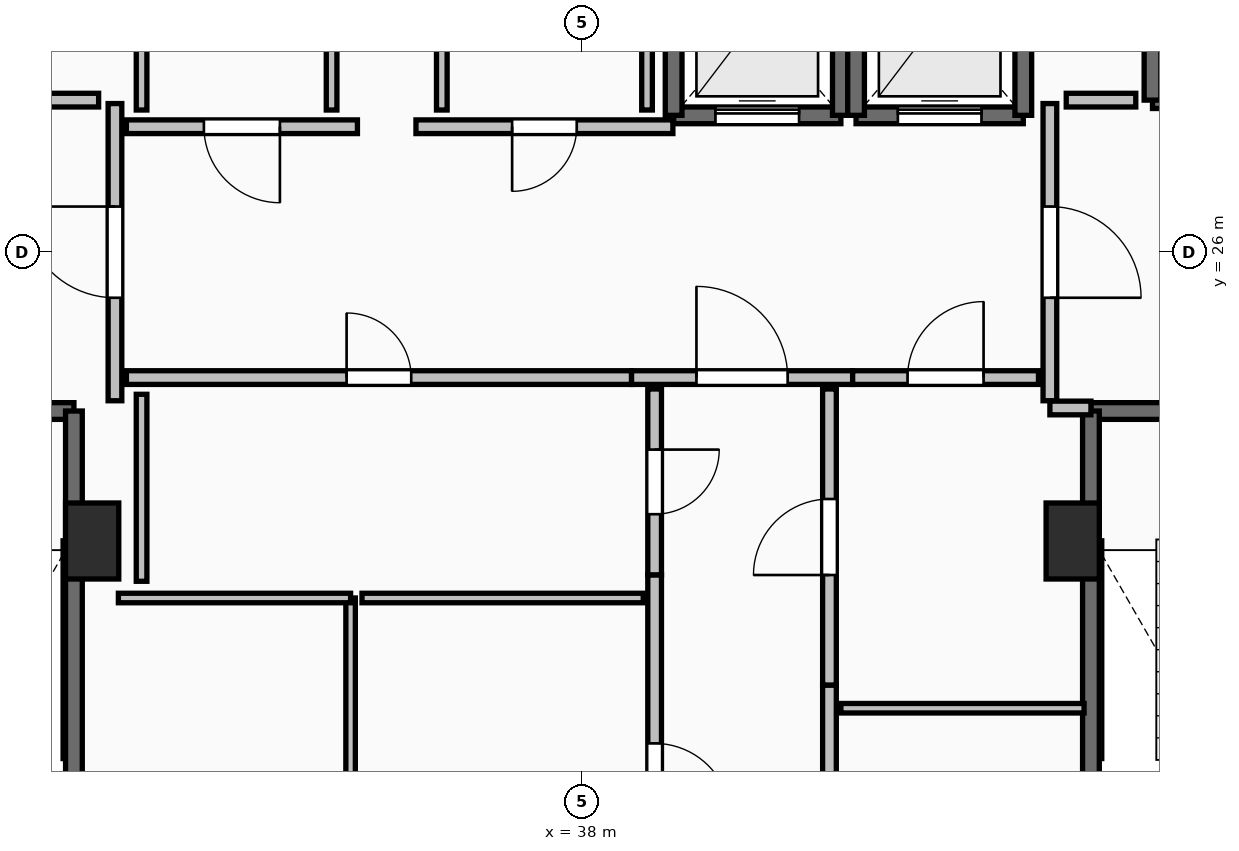
"""IFC4 building model, lengths in metres.
Left out: names, types, materials, properties, quantities, classifications, styles, units other than length and angle.
Written with IfcOpenShell. Run it as: python <this file> out.ifc"""

import sys

from ifc_helpers import new_model, si_unit, direction, frame, frame_2d, origin, origin_2d, place, context, subcontext, project, spatial, rectangle, extrude, element, fill, save


model = new_model("IFC4")
c1 = context("Model", 3, precision=1e-05, world=origin(), true_north=direction((0.0, 1.0)))
c2 = subcontext(c1, "Body", "Model", "MODEL_VIEW")
j1 = project(units=[si_unit("LENGTHUNIT", "METRE"), si_unit("PLANEANGLEUNIT", "RADIAN")], contexts=[c1])
p1 = place(None, origin())
s1 = spatial("IfcSite", under=j1, at=p1, CompositionType="ELEMENT")
p2 = place(p1, origin())
s2 = spatial("IfcBuilding", under=s1, at=p2, CompositionType="ELEMENT")
p3 = place(p2, frame((0.0, 0.0, 276.85)))
s3 = spatial("IfcBuildingStorey", under=s2, at=p3, CompositionType="ELEMENT", Elevation=276.85)
for number, where, z_axis, x_axis in (
    (1, (31.55, 22.2, 0.0), (0.0, 0.0, 1.0), (1.0, 0.0, 0.0)),
    (2, (44.45, 22.2, 0.0), (0.0, 0.0, 1.0), (1.0, 0.0, 0.0)),
):
    element("IfcColumn", number, at=place(p3, frame(where, z_axis=z_axis, x_axis=x_axis)), inside=s3, PredefinedType="PILASTER", context=c2, shape_type="SweptSolid", body=[
        extrude(rectangle(XDim=0.7, YDim=1.0, at=origin_2d()), origin(), (0.0, 0.0, 1.0), 3.55),
    ])
p4 = place(p3, frame((27.94, 23.91, 0.0), z_axis=(0.0, 0.0, 1.0), x_axis=(1.0, 0.0, 0.0)))
e3 = element("IfcWall", 3, at=p4, inside=s3, PredefinedType="SOLIDWALL", context=c2, shape_type="SweptSolid", body=[
    extrude(rectangle(XDim=3.37, YDim=0.22, at=frame_2d((1.685, 0.0))), origin(), (0.0, 0.0, 1.0), 3.19),
])
p5 = place(p4, frame((1.135, 0.0, 0.0)))
e4 = element("IfcOpeningElement", 4, at=p5, cuts=e3, PredefinedType="OPENING", context=c2, shape_type="SweptSolid", body=[
    extrude(rectangle(XDim=1.1, YDim=2.15, at=frame_2d((0.55, 1.075))), frame((0.0, 0.125, 0.0), z_axis=(0.0, -1.0, 0.0), x_axis=(1.0, 0.0, 0.0)), (0.0, 0.0, 1.0), 0.25),
])
p6 = place(p3, frame((31.31, 23.91, 0.0), z_axis=(0.0, 0.0, 1.0), x_axis=(0.0, -1.0, 0.0)))
e5 = element("IfcWall", 5, at=p6, inside=s3, PredefinedType="SOLIDWALL", context=c2, shape_type="SweptSolid", body=[
    extrude(rectangle(XDim=7.42, YDim=0.22, at=frame_2d((3.71, 0.0))), origin(), (0.0, 0.0, 1.0), 3.19),
])
p7 = place(p3, frame((44.69, 23.91, 0.0), z_axis=(0.0, 0.0, 1.0), x_axis=(1.0, 0.0, 0.0)))
e6 = element("IfcWall", 6, at=p7, inside=s3, PredefinedType="SOLIDWALL", context=c2, shape_type="SweptSolid", body=[
    extrude(rectangle(XDim=3.37, YDim=0.22, at=frame_2d((1.685, 0.0))), origin(), (0.0, 0.0, 1.0), 3.19),
])
p8 = place(p7, frame((1.135, 0.0, 0.0)))
e7 = element("IfcOpeningElement", 7, at=p8, cuts=e6, PredefinedType="OPENING", context=c2, shape_type="SweptSolid", body=[
    extrude(rectangle(XDim=1.1, YDim=2.15, at=frame_2d((0.55, 1.075))), frame((0.0, 0.125, 0.0), z_axis=(0.0, -1.0, 0.0), x_axis=(1.0, 0.0, 0.0)), (0.0, 0.0, 1.0), 0.25),
])
p9 = place(p3, frame((44.69, 16.49, 0.0), z_axis=(0.0, 0.0, 1.0), x_axis=(0.0, 1.0, 0.0)))
e8 = element("IfcWall", 8, at=p9, inside=s3, PredefinedType="SOLIDWALL", context=c2, shape_type="SweptSolid", body=[
    extrude(rectangle(XDim=7.42, YDim=0.22, at=frame_2d((3.71, 0.0))), origin(), (0.0, 0.0, 1.0), 3.19),
])
p10 = place(p3, frame((39.2, 27.8, 0.0), z_axis=(0.0, 0.0, 1.0), x_axis=(1.0, 0.0, 0.0)))
e9 = element("IfcWall", 9, at=p10, inside=s3, PredefinedType="SOLIDWALL", context=c2, shape_type="SweptSolid", body=[
    extrude(rectangle(XDim=2.2, YDim=0.22, at=frame_2d((1.1, 0.0))), origin(), (0.0, 0.0, 1.0), 3.19),
])
p11 = place(p10, frame((0.55, 0.0, 0.0)))
e10 = element("IfcOpeningElement", 10, at=p11, cuts=e9, PredefinedType="OPENING", context=c2, shape_type="SweptSolid", body=[
    extrude(rectangle(XDim=1.1, YDim=2.2, at=frame_2d((0.55, 1.1))), frame((0.0, 0.125, 0.0), z_axis=(0.0, -1.0, 0.0), x_axis=(1.0, 0.0, 0.0)), (0.0, 0.0, 1.0), 0.25),
])
for number, where, z_axis, x_axis in (
    (11, (41.4, 27.8, 0.0), (0.0, 0.0, 1.0), (0.0, 1.0, 0.0)),
    (12, (39.2, 30.4, 0.0), (0.0, 0.0, 1.0), (0.0, -1.0, 0.0)),
):
    element("IfcWall", number, at=place(p3, frame(where, z_axis=z_axis, x_axis=x_axis)), inside=s3, PredefinedType="SOLIDWALL", context=c2, shape_type="SweptSolid", body=[
        extrude(rectangle(XDim=2.6, YDim=0.22, at=frame_2d((1.3, 0.0))), origin(), (0.0, 0.0, 1.0), 3.19),
    ])
p12 = place(p3, frame((41.6, 27.8, 0.0), z_axis=(0.0, 0.0, 1.0), x_axis=(1.0, 0.0, 0.0)))
e13 = element("IfcWall", 13, at=p12, inside=s3, PredefinedType="SOLIDWALL", context=c2, shape_type="SweptSolid", body=[
    extrude(rectangle(XDim=2.2, YDim=0.22, at=frame_2d((1.1, 0.0))), origin(), (0.0, 0.0, 1.0), 3.19),
])
p13 = place(p12, frame((0.55, 0.0, 0.0)))
e14 = element("IfcOpeningElement", 14, at=p13, cuts=e13, PredefinedType="OPENING", context=c2, shape_type="SweptSolid", body=[
    extrude(rectangle(XDim=1.1, YDim=2.2, at=frame_2d((0.55, 1.1))), frame((0.0, 0.125, 0.0), z_axis=(0.0, -1.0, 0.0), x_axis=(1.0, 0.0, 0.0)), (0.0, 0.0, 1.0), 0.25),
])
for number, where, z_axis, x_axis in (
    (15, (43.8, 27.8, 0.0), (0.0, 0.0, 1.0), (0.0, 1.0, 0.0)),
    (16, (41.6, 30.4, 0.0), (0.0, 0.0, 1.0), (0.0, -1.0, 0.0)),
):
    element("IfcWall", number, at=place(p3, frame(where, z_axis=z_axis, x_axis=x_axis)), inside=s3, PredefinedType="SOLIDWALL", context=c2, shape_type="SweptSolid", body=[
        extrude(rectangle(XDim=2.6, YDim=0.22, at=frame_2d((1.3, 0.0))), origin(), (0.0, 0.0, 1.0), 3.19),
    ])
p14 = place(p3, frame((45.5, 28.0, 0.0), z_axis=(0.0, 0.0, 1.0), x_axis=(1.0, 0.0, 0.0)))
e17 = element("IfcWall", 17, at=p14, inside=s3, PredefinedType="SHEAR", context=c2, shape_type="SweptSolid", body=[
    extrude(rectangle(XDim=2.4, YDim=0.22, at=frame_2d((1.2, 0.0))), origin(), (0.0, 0.0, 1.0), 3.19),
])
p15 = place(p14, frame((0.6, 0.0, 0.0)))
e18 = element("IfcOpeningElement", 18, at=p15, cuts=e17, PredefinedType="OPENING", context=c2, shape_type="SweptSolid", body=[
    extrude(rectangle(XDim=1.2, YDim=2.2, at=frame_2d((0.6, 1.1))), frame((0.0, 0.125, 0.0), z_axis=(0.0, -1.0, 0.0), x_axis=(1.0, 0.0, 0.0)), (0.0, 0.0, 1.0), 0.25),
])
p16 = place(p3, frame((45.5, 30.5, 0.0), z_axis=(0.0, 0.0, 1.0), x_axis=(0.0, -1.0, 0.0)))
e19 = element("IfcWall", 19, at=p16, inside=s3, PredefinedType="SHEAR", context=c2, shape_type="SweptSolid", body=[
    extrude(rectangle(XDim=2.5, YDim=0.22, at=frame_2d((1.25, 0.0))), origin(), (0.0, 0.0, 1.0), 3.19),
])
p17 = place(p3, frame((31.85, 24.045, 0.0), z_axis=(0.0, 0.0, 1.0), x_axis=(0.0, 1.0, 0.0)))
e20 = element("IfcWall", 20, at=p17, inside=s3, PredefinedType="PARTITIONING", context=c2, shape_type="SweptSolid", body=[
    extrude(rectangle(XDim=3.91, YDim=0.18, at=frame_2d((1.955, 0.0))), origin(), (0.0, 0.0, 1.0), 3.19),
])
p18 = place(p17, frame((1.355, 0.0, 0.0)))
e21 = element("IfcOpeningElement", 21, at=p18, cuts=e20, PredefinedType="OPENING", context=c2, shape_type="SweptSolid", body=[
    extrude(rectangle(XDim=1.2, YDim=2.15, at=frame_2d((0.6, 1.075))), frame((0.0, 0.105, 0.0), z_axis=(0.0, -1.0, 0.0), x_axis=(1.0, 0.0, 0.0)), (0.0, 0.0, 1.0), 0.21),
])
p19 = place(p3, frame((44.15, 27.955, 0.0), z_axis=(0.0, 0.0, 1.0), x_axis=(0.0, -1.0, 0.0)))
e22 = element("IfcWall", 22, at=p19, inside=s3, PredefinedType="PARTITIONING", context=c2, shape_type="SweptSolid", body=[
    extrude(rectangle(XDim=3.91, YDim=0.18, at=frame_2d((1.955, 0.0))), origin(), (0.0, 0.0, 1.0), 3.19),
])
p20 = place(p19, frame((1.355, 0.0, 0.0)))
e23 = element("IfcOpeningElement", 23, at=p20, cuts=e22, PredefinedType="OPENING", context=c2, shape_type="SweptSolid", body=[
    extrude(rectangle(XDim=1.2, YDim=2.15, at=frame_2d((0.6, 1.075))), frame((0.0, 0.105, 0.0), z_axis=(0.0, -1.0, 0.0), x_axis=(1.0, 0.0, 0.0)), (0.0, 0.0, 1.0), 0.21),
])
p21 = place(p3, frame((44.15, 23.95, 0.0), z_axis=(0.0, 0.0, 1.0), x_axis=(1.0, 0.0, 0.0)))
e24 = element("IfcWall", 24, at=p21, inside=s3, PredefinedType="PARTITIONING", context=c2, shape_type="SweptSolid", body=[
    extrude(rectangle(XDim=0.54, YDim=0.18, at=frame_2d((0.27, 0.0))), origin(), (0.0, 0.0, 1.0), 3.19),
])
p22 = place(p3, frame((38.645, 24.35, 0.0), z_axis=(0.0, 0.0, 1.0), x_axis=(1.0, 0.0, 0.0)))
e25 = element("IfcWall", 25, at=p22, inside=s3, PredefinedType="PARTITIONING", context=c2, shape_type="SweptSolid", body=[
    extrude(rectangle(XDim=2.91, YDim=0.18, at=frame_2d((1.455, 0.0))), origin(), (0.0, 0.0, 1.0), 3.19),
])
p23 = place(p22, frame((0.855, 0.0, 0.0)))
e26 = element("IfcOpeningElement", 26, at=p23, cuts=e25, PredefinedType="OPENING", context=c2, shape_type="SweptSolid", body=[
    extrude(rectangle(XDim=1.2, YDim=2.15, at=frame_2d((0.6, 1.075))), frame((0.0, 0.105, 0.0), z_axis=(0.0, -1.0, 0.0), x_axis=(1.0, 0.0, 0.0)), (0.0, 0.0, 1.0), 0.21),
])
p24 = place(p3, frame((41.555, 24.35, 0.0), z_axis=(0.0, 0.0, 1.0), x_axis=(1.0, 0.0, 0.0)))
e27 = element("IfcWall", 27, at=p24, inside=s3, PredefinedType="PARTITIONING", context=c2, shape_type="SweptSolid", body=[
    extrude(rectangle(XDim=2.445, YDim=0.18, at=frame_2d((1.223, 0.0))), origin(), (0.0, 0.0, 1.0), 3.19),
])
p25 = place(p24, frame((0.722, 0.0, 0.0)))
e28 = element("IfcOpeningElement", 28, at=p25, cuts=e27, PredefinedType="OPENING", context=c2, shape_type="SweptSolid", body=[
    extrude(rectangle(XDim=1.0, YDim=2.15, at=frame_2d((0.5, 1.075))), frame((0.0, 0.105, 0.0), z_axis=(0.0, -1.0, 0.0), x_axis=(1.0, 0.0, 0.0)), (0.0, 0.0, 1.0), 0.21),
])
p26 = place(p3, frame((35.04, 27.65, 0.0), z_axis=(0.0, 0.0, 1.0), x_axis=(-1.0, 0.0, 0.0)))
e29 = element("IfcWall", 29, at=p26, inside=s3, PredefinedType="PARTITIONING", context=c2, shape_type="SweptSolid", body=[
    extrude(rectangle(XDim=3.04, YDim=0.18, at=frame_2d((1.52, 0.0))), origin(), (0.0, 0.0, 1.0), 3.19),
])
p27 = place(p26, frame((1.02, 0.0, 0.0)))
e30 = element("IfcOpeningElement", 30, at=p27, cuts=e29, PredefinedType="OPENING", context=c2, shape_type="SweptSolid", body=[
    extrude(rectangle(XDim=1.0, YDim=2.15, at=frame_2d((0.5, 1.075))), frame((0.0, 0.105, 0.0), z_axis=(0.0, -1.0, 0.0), x_axis=(1.0, 0.0, 0.0)), (0.0, 0.0, 1.0), 0.21),
])
p28 = place(p3, frame((39.19, 27.65, 0.0), z_axis=(0.0, 0.0, 1.0), x_axis=(-1.0, 0.0, 0.0)))
e31 = element("IfcWall", 31, at=p28, inside=s3, PredefinedType="PARTITIONING", context=c2, shape_type="SweptSolid", body=[
    extrude(rectangle(XDim=3.38, YDim=0.18, at=frame_2d((1.69, 0.0))), origin(), (0.0, 0.0, 1.0), 3.19),
])
p29 = place(p28, frame((1.265, 0.0, 0.0)))
e32 = element("IfcOpeningElement", 32, at=p29, cuts=e31, PredefinedType="OPENING", context=c2, shape_type="SweptSolid", body=[
    extrude(rectangle(XDim=0.85, YDim=2.1, at=frame_2d((0.425, 1.05))), frame((0.0, 0.105, 0.0), z_axis=(0.0, -1.0, 0.0), x_axis=(1.0, 0.0, 0.0)), (0.0, 0.0, 1.0), 0.21),
])
p30 = place(p3, frame((32.0, 24.35, 0.0), z_axis=(0.0, 0.0, 1.0), x_axis=(1.0, 0.0, 0.0)))
e33 = element("IfcWall", 33, at=p30, inside=s3, PredefinedType="PARTITIONING", context=c2, shape_type="SweptSolid", body=[
    extrude(rectangle(XDim=6.645, YDim=0.18, at=frame_2d((3.323, 0.0))), origin(), (0.0, 0.0, 1.0), 3.19),
])
p31 = place(p30, frame((2.897, 0.0, 0.0)))
e34 = element("IfcOpeningElement", 34, at=p31, cuts=e33, PredefinedType="OPENING", context=c2, shape_type="SweptSolid", body=[
    extrude(rectangle(XDim=0.85, YDim=2.1, at=frame_2d((0.425, 1.05))), frame((0.0, 0.105, 0.0), z_axis=(0.0, -1.0, 0.0), x_axis=(1.0, 0.0, 0.0)), (0.0, 0.0, 1.0), 0.21),
])
p32 = place(p3, frame((41.25, 16.32, 0.0), z_axis=(0.0, 0.0, 1.0), x_axis=(0.0, 1.0, 0.0)))
e35 = element("IfcWall", 35, at=p32, inside=s3, PredefinedType="PARTITIONING", context=c2, shape_type="SweptSolid", body=[
    extrude(rectangle(XDim=3.985, YDim=0.18, at=frame_2d((1.992, 0.0))), origin(), (0.0, 0.0, 1.0), 3.19),
])
p33 = place(p32, frame((1.593, 0.0, 0.0)))
e36 = element("IfcOpeningElement", 36, at=p33, cuts=e35, PredefinedType="OPENING", context=c2, shape_type="SweptSolid", body=[
    extrude(rectangle(XDim=0.8, YDim=2.05, at=frame_2d((0.4, 1.025))), frame((0.0, 0.105, 0.0), z_axis=(0.0, -1.0, 0.0), x_axis=(1.0, 0.0, 0.0)), (0.0, 0.0, 1.0), 0.21),
])
p34 = place(p3, frame((41.25, 20.305, 0.0), z_axis=(0.0, 0.0, 1.0), x_axis=(0.0, 1.0, 0.0)))
e37 = element("IfcWall", 37, at=p34, inside=s3, PredefinedType="PARTITIONING", context=c2, shape_type="SweptSolid", body=[
    extrude(rectangle(XDim=3.895, YDim=0.18, at=frame_2d((1.948, 0.0))), origin(), (0.0, 0.0, 1.0), 3.19),
])
p35 = place(p34, frame((1.448, 0.0, 0.0)))
e38 = element("IfcOpeningElement", 38, at=p35, cuts=e37, PredefinedType="OPENING", context=c2, shape_type="SweptSolid", body=[
    extrude(rectangle(XDim=1.0, YDim=2.15, at=frame_2d((0.5, 1.075))), frame((0.0, 0.105, 0.0), z_axis=(0.0, -1.0, 0.0), x_axis=(1.0, 0.0, 0.0)), (0.0, 0.0, 1.0), 0.21),
])
p36 = place(p3, frame((38.95, 21.755, 0.0), z_axis=(0.0, 0.0, 1.0), x_axis=(0.0, -1.0, 0.0)))
e39 = element("IfcWall", 39, at=p36, inside=s3, PredefinedType="PARTITIONING", context=c2, shape_type="SweptSolid", body=[
    extrude(rectangle(XDim=5.435, YDim=0.18, at=frame_2d((2.717, 0.0))), origin(), (0.0, 0.0, 1.0), 3.19),
])
p37 = place(p36, frame((2.218, 0.0, 0.0)))
e40 = element("IfcOpeningElement", 40, at=p37, cuts=e39, PredefinedType="OPENING", context=c2, shape_type="SweptSolid", body=[
    extrude(rectangle(XDim=1.0, YDim=2.15, at=frame_2d((0.5, 1.075))), frame((0.0, 0.105, 0.0), z_axis=(0.0, -1.0, 0.0), x_axis=(1.0, 0.0, 0.0)), (0.0, 0.0, 1.0), 0.21),
])
p38 = place(p3, frame((38.95, 24.2, 0.0), z_axis=(0.0, 0.0, 1.0), x_axis=(0.0, -1.0, 0.0)))
e41 = element("IfcWall", 41, at=p38, inside=s3, PredefinedType="PARTITIONING", context=c2, shape_type="SweptSolid", body=[
    extrude(rectangle(XDim=2.445, YDim=0.18, at=frame_2d((1.223, 0.0))), origin(), (0.0, 0.0, 1.0), 3.19),
])
p39 = place(p38, frame((0.798, 0.0, 0.0)))
e42 = element("IfcOpeningElement", 42, at=p39, cuts=e41, PredefinedType="OPENING", context=c2, shape_type="SweptSolid", body=[
    extrude(rectangle(XDim=0.85, YDim=2.1, at=frame_2d((0.425, 1.05))), frame((0.0, 0.105, 0.0), z_axis=(0.0, -1.0, 0.0), x_axis=(1.0, 0.0, 0.0)), (0.0, 0.0, 1.0), 0.21),
])
p40 = place(p3, frame((44.6, 20.0, 0.0), z_axis=(0.0, 0.0, 1.0), x_axis=(-1.0, 0.0, 0.0)))
e43 = element("IfcWall", 43, at=p40, inside=s3, PredefinedType="PARTITIONING", context=c2, shape_type="SweptSolid", body=[
    extrude(rectangle(XDim=3.2, YDim=0.125, at=frame_2d((1.6, 0.0))), origin(), (0.0, 0.0, 1.0), 3.19),
])
p41 = place(p3, frame((34.95, 16.32, 0.0), z_axis=(0.0, 0.0, 1.0), x_axis=(0.0, 1.0, 0.0)))
e44 = element("IfcWall", 44, at=p41, inside=s3, PredefinedType="PARTITIONING", context=c2, shape_type="SweptSolid", body=[
    extrude(rectangle(XDim=5.13, YDim=0.125, at=frame_2d((2.565, 0.0))), origin(), (0.0, 0.0, 1.0), 3.19),
])
p42 = place(p3, frame((34.95, 21.45, 0.0), z_axis=(0.0, 0.0, 1.0), x_axis=(-1.0, 0.0, 0.0)))
e45 = element("IfcWall", 45, at=p42, inside=s3, PredefinedType="PARTITIONING", context=c2, shape_type="SweptSolid", body=[
    extrude(rectangle(XDim=3.055, YDim=0.125, at=frame_2d((1.527, 0.0))), origin(), (0.0, 0.0, 1.0), 3.19),
])
p43 = place(p3, frame((38.8, 21.45, 0.0), z_axis=(0.0, 0.0, 1.0), x_axis=(-1.0, 0.0, 0.0)))
e46 = element("IfcWall", 46, at=p43, inside=s3, PredefinedType="PARTITIONING", context=c2, shape_type="SweptSolid", body=[
    extrude(rectangle(XDim=3.7, YDim=0.125, at=frame_2d((1.85, 0.0))), origin(), (0.0, 0.0, 1.0), 3.19),
])
for number, where, z_axis, x_axis in (
    (47, (31.635, 28.0, 0.0), (0.0, 0.0, 1.0), (-1.0, 0.0, 0.0)),
    (48, (45.28, 28.0, 0.0), (0.0, 0.0, 1.0), (-1.0, 0.0, 0.0)),
):
    element("IfcWall", number, at=place(p3, frame(where, z_axis=z_axis, x_axis=x_axis)), inside=s3, PredefinedType="PARTITIONING", context=c2, shape_type="SweptSolid", body=[
        extrude(rectangle(XDim=0.915, YDim=0.18, at=frame_2d((0.458, 0.0))), origin(), (0.0, 0.0, 1.0), 3.19),
    ])
for number, where, z_axis, x_axis in (
    (49, (32.2, 30.26, 0.0), (0.0, 0.0, 1.0), (0.0, -1.0, 0.0)),
    (50, (34.7, 27.87, 0.0), (0.0, 0.0, 1.0), (0.0, 1.0, 0.0)),
    (51, (36.15, 30.26, 0.0), (0.0, 0.0, 1.0), (0.0, -1.0, 0.0)),
    (52, (38.85, 27.87, 0.0), (0.0, 0.0, 1.0), (0.0, 1.0, 0.0)),
):
    element("IfcWall", number, at=place(p3, frame(where, z_axis=z_axis, x_axis=x_axis)), inside=s3, PredefinedType="PARTITIONING", context=c2, shape_type="SweptSolid", body=[
        extrude(rectangle(XDim=2.39, YDim=0.14, at=frame_2d((1.195, 0.0))), origin(), (0.0, 0.0, 1.0), 3.19),
    ])
p44 = place(p3, frame((32.2, 24.13, 0.0), z_axis=(0.0, 0.0, 1.0), x_axis=(0.0, -1.0, 0.0)))
e53 = element("IfcWall", 53, at=p44, inside=s3, PredefinedType="PARTITIONING", context=c2, shape_type="SweptSolid", body=[
    extrude(rectangle(XDim=2.46, YDim=0.14, at=frame_2d((1.23, 0.0))), origin(), (0.0, 0.0, 1.0), 3.19),
])
p45 = place(p11, origin())
e54 = element("IfcDoor", 54, at=p45, inside=s3, OperationType="SLIDING_TO_LEFT", PredefinedType="DOOR", context=c2, shape_type="SweptSolid", body=[
    extrude(rectangle(XDim=1.1, YDim=2.2, at=frame_2d((0.55, 1.1))), frame((0.0, 0.025, 0.0), z_axis=(0.0, -1.0, 0.0), x_axis=(1.0, 0.0, 0.0)), (0.0, 0.0, 1.0), 0.05),
])
fill(e10, e54)
p46 = place(p13, origin())
e55 = element("IfcDoor", 55, at=p46, inside=s3, OperationType="SLIDING_TO_LEFT", PredefinedType="DOOR", context=c2, shape_type="SweptSolid", body=[
    extrude(rectangle(XDim=1.1, YDim=2.2, at=frame_2d((0.55, 1.1))), frame((0.0, 0.025, 0.0), z_axis=(0.0, -1.0, 0.0), x_axis=(1.0, 0.0, 0.0)), (0.0, 0.0, 1.0), 0.05),
])
fill(e14, e55)
p47 = place(p18, origin())
e56 = element("IfcDoor", 56, at=p47, inside=s3, OperationType="SINGLE_SWING_RIGHT", PredefinedType="DOOR", context=c2, shape_type="SweptSolid", body=[
    extrude(rectangle(XDim=1.2, YDim=2.15, at=frame_2d((0.6, 1.075))), frame((0.0, 0.025, 0.0), z_axis=(0.0, -1.0, 0.0), x_axis=(1.0, 0.0, 0.0)), (0.0, 0.0, 1.0), 0.05),
])
fill(e21, e56)
p48 = place(p20, origin())
e57 = element("IfcDoor", 57, at=p48, inside=s3, OperationType="SINGLE_SWING_RIGHT", PredefinedType="DOOR", context=c2, shape_type="SweptSolid", body=[
    extrude(rectangle(XDim=1.2, YDim=2.15, at=frame_2d((0.6, 1.075))), frame((0.0, 0.025, 0.0), z_axis=(0.0, -1.0, 0.0), x_axis=(1.0, 0.0, 0.0)), (0.0, 0.0, 1.0), 0.05),
])
fill(e23, e57)
p49 = place(p23, origin())
e58 = element("IfcDoor", 58, at=p49, inside=s3, OperationType="SINGLE_SWING_LEFT", PredefinedType="DOOR", context=c2, shape_type="SweptSolid", body=[
    extrude(rectangle(XDim=1.2, YDim=2.15, at=frame_2d((0.6, 1.075))), frame((0.0, 0.025, 0.0), z_axis=(0.0, -1.0, 0.0), x_axis=(1.0, 0.0, 0.0)), (0.0, 0.0, 1.0), 0.05),
])
fill(e26, e58)
p50 = place(p25, origin())
e59 = element("IfcDoor", 59, at=p50, inside=s3, OperationType="SINGLE_SWING_RIGHT", PredefinedType="DOOR", context=c2, shape_type="SweptSolid", body=[
    extrude(rectangle(XDim=1.0, YDim=2.15, at=frame_2d((0.5, 1.075))), frame((0.0, 0.025, 0.0), z_axis=(0.0, -1.0, 0.0), x_axis=(1.0, 0.0, 0.0)), (0.0, 0.0, 1.0), 0.05),
])
fill(e28, e59)
p51 = place(p27, origin())
e60 = element("IfcDoor", 60, at=p51, inside=s3, OperationType="SINGLE_SWING_LEFT", PredefinedType="DOOR", context=c2, shape_type="SweptSolid", body=[
    extrude(rectangle(XDim=1.0, YDim=2.15, at=frame_2d((0.5, 1.075))), frame((0.0, 0.025, 0.0), z_axis=(0.0, -1.0, 0.0), x_axis=(1.0, 0.0, 0.0)), (0.0, 0.0, 1.0), 0.05),
])
fill(e30, e60)
p52 = place(p29, origin())
e61 = element("IfcDoor", 61, at=p52, inside=s3, OperationType="SINGLE_SWING_RIGHT", PredefinedType="DOOR", context=c2, shape_type="SweptSolid", body=[
    extrude(rectangle(XDim=0.85, YDim=2.1, at=frame_2d((0.425, 1.05))), frame((0.0, 0.025, 0.0), z_axis=(0.0, -1.0, 0.0), x_axis=(1.0, 0.0, 0.0)), (0.0, 0.0, 1.0), 0.05),
])
fill(e32, e61)
p53 = place(p31, origin())
e62 = element("IfcDoor", 62, at=p53, inside=s3, OperationType="SINGLE_SWING_LEFT", PredefinedType="DOOR", context=c2, shape_type="SweptSolid", body=[
    extrude(rectangle(XDim=0.85, YDim=2.1, at=frame_2d((0.425, 1.05))), frame((0.0, 0.025, 0.0), z_axis=(0.0, -1.0, 0.0), x_axis=(1.0, 0.0, 0.0)), (0.0, 0.0, 1.0), 0.05),
])
fill(e34, e62)
p54 = place(p35, origin())
e63 = element("IfcDoor", 63, at=p54, inside=s3, OperationType="SINGLE_SWING_LEFT", PredefinedType="DOOR", context=c2, shape_type="SweptSolid", body=[
    extrude(rectangle(XDim=1.0, YDim=2.15, at=frame_2d((0.5, 1.075))), frame((0.0, 0.025, 0.0), z_axis=(0.0, -1.0, 0.0), x_axis=(1.0, 0.0, 0.0)), (0.0, 0.0, 1.0), 0.05),
])
fill(e38, e63)
p55 = place(p37, origin())
e64 = element("IfcDoor", 64, at=p55, inside=s3, OperationType="SINGLE_SWING_RIGHT", PredefinedType="DOOR", context=c2, shape_type="SweptSolid", body=[
    extrude(rectangle(XDim=1.0, YDim=2.15, at=frame_2d((0.5, 1.075))), frame((0.0, 0.025, 0.0), z_axis=(0.0, -1.0, 0.0), x_axis=(1.0, 0.0, 0.0)), (0.0, 0.0, 1.0), 0.05),
])
fill(e40, e64)
p56 = place(p39, origin())
e65 = element("IfcDoor", 65, at=p56, inside=s3, OperationType="SINGLE_SWING_LEFT", PredefinedType="DOOR", context=c2, shape_type="SweptSolid", body=[
    extrude(rectangle(XDim=0.85, YDim=2.1, at=frame_2d((0.425, 1.05))), frame((0.0, 0.025, 0.0), z_axis=(0.0, -1.0, 0.0), x_axis=(1.0, 0.0, 0.0)), (0.0, 0.0, 1.0), 0.05),
])
fill(e42, e65)
save(model, sys.argv[1])
